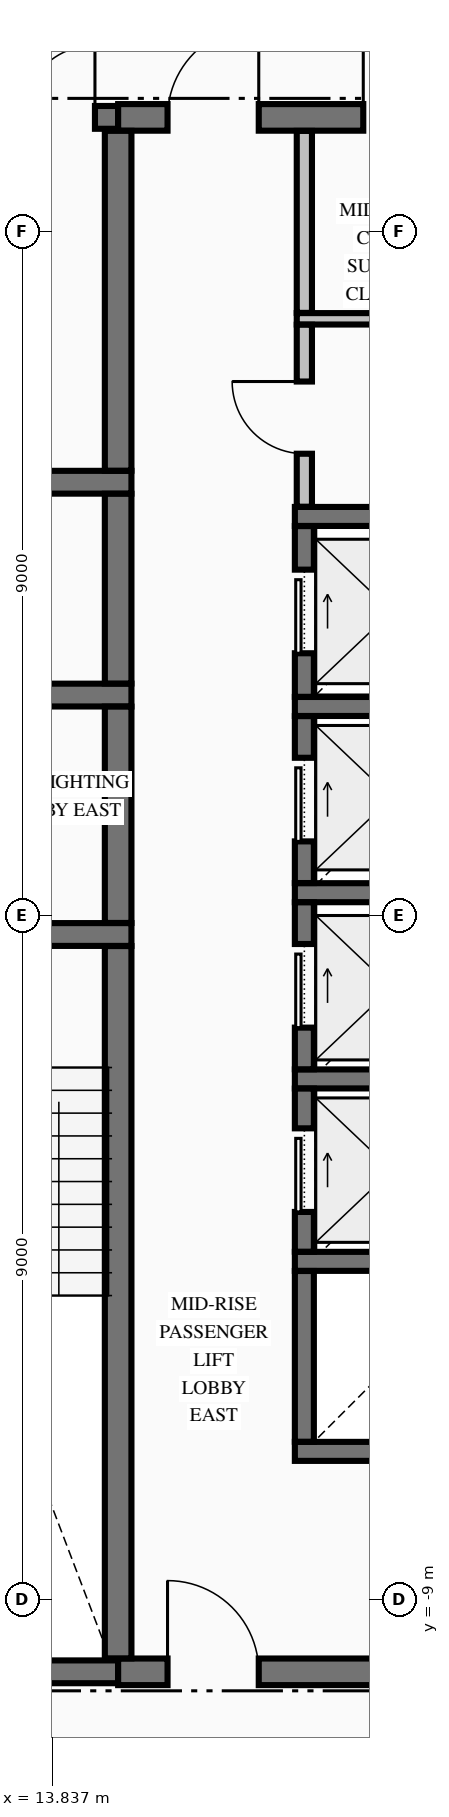
"""IFC4 building model, lengths in metres.
Left out: names, types, materials, properties, quantities, classifications, styles, units other than length and angle.
Written with IfcOpenShell. Run it as: python <this file> out.ifc"""

import sys

from ifc_helpers import new_model, si_unit, direction, frame, frame_2d, origin, place, context, subcontext, project, spatial, rectangle, extrude, element, fill, save


model = new_model("IFC4")
c1 = context("Model", 3, precision=1e-05, world=origin(), true_north=direction((0.0, 1.0)))
c2 = subcontext(c1, "Body", "Model", "MODEL_VIEW")
j1 = project(units=[si_unit("LENGTHUNIT", "METRE"), si_unit("PLANEANGLEUNIT", "RADIAN")], contexts=[c1])
p1 = place(None, origin())
s1 = spatial("IfcSite", under=j1, at=p1, CompositionType="ELEMENT")
p2 = place(p1, origin())
s2 = spatial("IfcBuilding", under=s1, at=p2, CompositionType="ELEMENT")
p3 = place(p2, frame((0.0, 0.0, 146.34)))
s3 = spatial("IfcBuildingStorey", under=s2, at=p3, CompositionType="ELEMENT", Elevation=146.34)
p4 = place(p3, frame((11.504, -9.95, 0.0), z_axis=(0.0, 0.0, 1.0), x_axis=(1.0, 0.0, 0.0)))
e1 = element("IfcWall", 1, at=p4, inside=s3, PredefinedType="SHEAR", context=c2, shape_type="SweptSolid", body=[
    extrude(rectangle(XDim=3.196, YDim=0.3, at=frame_2d((1.598, 0.0))), origin(), (0.0, 0.0, 1.0), 3.32),
])
p5 = place(p3, frame((14.7, -9.95, 0.0), z_axis=(0.0, 0.0, 1.0), x_axis=(1.0, 0.0, 0.0)))
e2 = element("IfcWall", 2, at=p5, inside=s3, PredefinedType="SHEAR", context=c2, shape_type="SweptSolid", body=[
    extrude(rectangle(XDim=4.796, YDim=0.35, at=frame_2d((2.398, 0.0))), origin(), (0.0, 0.0, 1.0), 3.32),
])
p6 = place(p5, frame((0.65, 0.0, 0.0)))
e3 = element("IfcOpeningElement", 3, at=p6, cuts=e2, PredefinedType="OPENING", context=c2, shape_type="SweptSolid", body=[
    extrude(rectangle(XDim=1.2, YDim=2.15, at=frame_2d((0.6, 1.075))), frame((0.0, 0.185, 0.0), z_axis=(0.0, -1.0, 0.0), x_axis=(1.0, 0.0, 0.0)), (0.0, 0.0, 1.0), 0.37),
])
for number, where, z_axis, x_axis in (
    (4, (17.025, -7.05, 0.0), (0.0, 0.0, 1.0), (1.0, 0.0, 0.0)),
    (5, (17.025, -4.55, 0.0), (0.0, 0.0, 1.0), (1.0, 0.0, 0.0)),
    (6, (17.025, -2.15, 0.0), (0.0, 0.0, 1.0), (1.0, 0.0, 0.0)),
):
    element("IfcWall", number, at=place(p3, frame(where, z_axis=z_axis, x_axis=x_axis)), inside=s3, PredefinedType="SOLIDWALL", context=c2, shape_type="SweptSolid", body=[
        extrude(rectangle(XDim=3.15, YDim=0.25, at=frame_2d((1.575, 0.0))), origin(), (0.0, 0.0, 1.0), 3.32),
    ])
p7 = place(p3, frame((11.504, -0.25, 0.0), z_axis=(0.0, 0.0, 1.0), x_axis=(1.0, 0.0, 0.0)))
e7 = element("IfcWall", 7, at=p7, inside=s3, PredefinedType="SHEAR", context=c2, shape_type="SweptSolid", body=[
    extrude(rectangle(XDim=3.371, YDim=0.3, at=frame_2d((1.686, 0.0))), origin(), (0.0, 0.0, 1.0), 3.32),
])
p8 = place(p7, frame((1.096, 0.0, 0.0)))
e8 = element("IfcOpeningElement", 8, at=p8, cuts=e7, PredefinedType="OPENING", context=c2, shape_type="SweptSolid", body=[
    extrude(rectangle(XDim=1.1, YDim=2.15, at=frame_2d((0.55, 1.075))), frame((0.0, 0.16, 0.0), z_axis=(0.0, -1.0, 0.0), x_axis=(1.0, 0.0, 0.0)), (0.0, 0.0, 1.0), 0.32),
])
p9 = place(p3, frame((17.025, 0.3, 0.0), z_axis=(0.0, 0.0, 1.0), x_axis=(1.0, 0.0, 0.0)))
e9 = element("IfcWall", 9, at=p9, inside=s3, PredefinedType="SOLIDWALL", context=c2, shape_type="SweptSolid", body=[
    extrude(rectangle(XDim=2.471, YDim=0.25, at=frame_2d((1.236, 0.0))), origin(), (0.0, 0.0, 1.0), 3.32),
])
p10 = place(p3, frame((17.025, 2.75, 0.0), z_axis=(0.0, 0.0, 1.0), x_axis=(1.0, 0.0, 0.0)))
e10 = element("IfcWall", 10, at=p10, inside=s3, PredefinedType="SOLIDWALL", context=c2, shape_type="SweptSolid", body=[
    extrude(rectangle(XDim=3.15, YDim=0.25, at=frame_2d((1.575, 0.0))), origin(), (0.0, 0.0, 1.0), 3.32),
])
p11 = place(p3, frame((10.85, 2.9, 0.0), z_axis=(0.0, 0.0, 1.0), x_axis=(1.0, 0.0, 0.0)))
e11 = element("IfcWall", 11, at=p11, inside=s3, PredefinedType="SHEAR", context=c2, shape_type="SweptSolid", body=[
    extrude(rectangle(XDim=4.025, YDim=0.3, at=frame_2d((2.012, 0.0))), origin(), (0.0, 0.0, 1.0), 3.32),
])
p12 = place(p11, frame((0.85, 0.0, 0.0)))
e12 = element("IfcOpeningElement", 12, at=p12, cuts=e11, PredefinedType="OPENING", context=c2, shape_type="SweptSolid", body=[
    extrude(rectangle(XDim=1.1, YDim=2.2, at=frame_2d((0.55, 1.1))), frame((0.0, 0.16, 0.0), z_axis=(0.0, -1.0, 0.0), x_axis=(1.0, 0.0, 0.0)), (0.0, 0.0, 1.0), 0.32),
])
p13 = place(p3, frame((17.025, 5.25, 0.0), z_axis=(0.0, 0.0, 1.0), x_axis=(1.0, 0.0, 0.0)))
e13 = element("IfcWall", 13, at=p13, inside=s3, PredefinedType="SOLIDWALL", context=c2, shape_type="SweptSolid", body=[
    extrude(rectangle(XDim=3.15, YDim=0.25, at=frame_2d((1.575, 0.0))), origin(), (0.0, 0.0, 1.0), 3.32),
])
p14 = place(p3, frame((10.85, 5.7, 0.0), z_axis=(0.0, 0.0, 1.0), x_axis=(1.0, 0.0, 0.0)))
e14 = element("IfcWall", 14, at=p14, inside=s3, PredefinedType="SHEAR", context=c2, shape_type="SweptSolid", body=[
    extrude(rectangle(XDim=4.025, YDim=0.3, at=frame_2d((2.012, 0.0))), origin(), (0.0, 0.0, 1.0), 3.32),
])
p15 = place(p3, frame((11.504, 10.5, 0.0), z_axis=(0.0, 0.0, 1.0), x_axis=(1.0, 0.0, 0.0)))
e15 = element("IfcWall", 15, at=p15, inside=s3, PredefinedType="SHEAR", context=c2, shape_type="SweptSolid", body=[
    extrude(rectangle(XDim=3.196, YDim=0.3, at=frame_2d((1.598, 0.0))), origin(), (0.0, 0.0, 1.0), 3.32),
])
p16 = place(p15, frame((1.941, 0.0, 0.0)))
e16 = element("IfcOpeningElement", 16, at=p16, cuts=e15, PredefinedType="OPENING", context=c2, shape_type="SweptSolid", body=[
    extrude(rectangle(XDim=0.95, YDim=2.15, at=frame_2d((0.475, 1.075))), frame((0.0, 0.16, 0.0), z_axis=(0.0, -1.0, 0.0), x_axis=(1.0, 0.0, 0.0)), (0.0, 0.0, 1.0), 0.32),
])
p17 = place(p3, frame((14.7, 10.5, 0.0), z_axis=(0.0, 0.0, 1.0), x_axis=(1.0, 0.0, 0.0)))
e17 = element("IfcWall", 17, at=p17, inside=s3, PredefinedType="SHEAR", context=c2, shape_type="SweptSolid", body=[
    extrude(rectangle(XDim=4.796, YDim=0.35, at=frame_2d((2.398, 0.0))), origin(), (0.0, 0.0, 1.0), 3.32),
])
p18 = place(p17, frame((0.65, 0.0, 0.0)))
e18 = element("IfcOpeningElement", 18, at=p18, cuts=e17, PredefinedType="OPENING", context=c2, shape_type="SweptSolid", body=[
    extrude(rectangle(XDim=1.2, YDim=2.15, at=frame_2d((0.6, 1.075))), frame((0.0, 0.185, 0.0), z_axis=(0.0, -1.0, 0.0), x_axis=(1.0, 0.0, 0.0)), (0.0, 0.0, 1.0), 0.37),
])
p19 = place(p17, frame((3.225, 0.0, 0.0)))
e19 = element("IfcOpeningElement", 19, at=p19, cuts=e17, PredefinedType="OPENING", context=c2, shape_type="SweptSolid", body=[
    extrude(rectangle(XDim=0.95, YDim=2.15, at=frame_2d((0.475, 1.075))), frame((0.0, 0.185, 0.0), z_axis=(0.0, -1.0, 0.0), x_axis=(1.0, 0.0, 0.0)), (0.0, 0.0, 1.0), 0.37),
])
p20 = place(p3, frame((17.05, 7.85, 0.0), z_axis=(0.0, 0.0, 1.0), x_axis=(1.0, 0.0, 0.0)))
e20 = element("IfcWall", 20, at=p20, inside=s3, PredefinedType="PARTITIONING", context=c2, shape_type="SweptSolid", body=[
    extrude(rectangle(XDim=2.772, YDim=0.15, at=frame_2d((1.386, 0.0))), origin(), (0.0, 0.0, 1.0), 3.32),
])
p21 = place(p3, frame((14.7, -9.773, 0.0), z_axis=(0.0, 0.0, 1.0), x_axis=(0.0, 1.0, 0.0)))
e21 = element("IfcWall", 21, at=p21, inside=s3, PredefinedType="SHEAR", context=c2, shape_type="SweptSolid", body=[
    extrude(rectangle(XDim=9.371, YDim=0.35, at=frame_2d((4.686, 0.0))), origin(), (0.0, 0.0, 1.0), 3.32),
])
p22 = place(p3, frame((14.7, -0.098, 0.0), z_axis=(0.0, 0.0, 1.0), x_axis=(0.0, 1.0, 0.0)))
e22 = element("IfcWall", 22, at=p22, inside=s3, PredefinedType="SHEAR", context=c2, shape_type="SweptSolid", body=[
    extrude(rectangle(XDim=2.846, YDim=0.35, at=frame_2d((1.423, 0.0))), origin(), (0.0, 0.0, 1.0), 3.32),
])
p23 = place(p3, frame((14.7, 3.052, 0.0), z_axis=(0.0, 0.0, 1.0), x_axis=(0.0, 1.0, 0.0)))
e23 = element("IfcWall", 23, at=p23, inside=s3, PredefinedType="SHEAR", context=c2, shape_type="SweptSolid", body=[
    extrude(rectangle(XDim=2.496, YDim=0.35, at=frame_2d((1.248, 0.0))), origin(), (0.0, 0.0, 1.0), 3.32),
])
p24 = place(p3, frame((14.7, 5.852, 0.0), z_axis=(0.0, 0.0, 1.0), x_axis=(0.0, 1.0, 0.0)))
e24 = element("IfcWall", 24, at=p24, inside=s3, PredefinedType="SHEAR", context=c2, shape_type="SweptSolid", body=[
    extrude(rectangle(XDim=4.471, YDim=0.35, at=frame_2d((2.235, 0.0))), origin(), (0.0, 0.0, 1.0), 3.32),
])
p25 = place(p3, frame((17.15, -6.923, 0.0), z_axis=(0.0, 0.0, 1.0), x_axis=(0.0, 1.0, 0.0)))
e25 = element("IfcWall", 25, at=p25, inside=s3, PredefinedType="SOLIDWALL", context=c2, shape_type="SweptSolid", body=[
    extrude(rectangle(XDim=2.246, YDim=0.25, at=frame_2d((1.123, 0.0))), origin(), (0.0, 0.0, 1.0), 3.32),
])
p26 = place(p3, frame((17.15, -4.423, 0.0), z_axis=(0.0, 0.0, 1.0), x_axis=(0.0, 1.0, 0.0)))
e26 = element("IfcWall", 26, at=p26, inside=s3, PredefinedType="SOLIDWALL", context=c2, shape_type="SweptSolid", body=[
    extrude(rectangle(XDim=2.146, YDim=0.25, at=frame_2d((1.073, 0.0))), origin(), (0.0, 0.0, 1.0), 3.32),
])
p27 = place(p26, frame((0.523, 0.0, 0.0)))
e27 = element("IfcOpeningElement", 27, at=p27, cuts=e26, PredefinedType="OPENING", context=c2, shape_type="SweptSolid", body=[
    extrude(rectangle(XDim=1.1, YDim=2.2, at=frame_2d((0.55, 1.1))), frame((0.0, 0.135, 0.0), z_axis=(0.0, -1.0, 0.0), x_axis=(1.0, 0.0, 0.0)), (0.0, 0.0, 1.0), 0.27),
])
p28 = place(p3, frame((17.15, -2.023, 0.0), z_axis=(0.0, 0.0, 1.0), x_axis=(0.0, 1.0, 0.0)))
e28 = element("IfcWall", 28, at=p28, inside=s3, PredefinedType="SOLIDWALL", context=c2, shape_type="SweptSolid", body=[
    extrude(rectangle(XDim=2.196, YDim=0.25, at=frame_2d((1.098, 0.0))), origin(), (0.0, 0.0, 1.0), 3.32),
])
p29 = place(p28, frame((0.548, 0.0, 0.0)))
e29 = element("IfcOpeningElement", 29, at=p29, cuts=e28, PredefinedType="OPENING", context=c2, shape_type="SweptSolid", body=[
    extrude(rectangle(XDim=1.1, YDim=2.2, at=frame_2d((0.55, 1.1))), frame((0.0, 0.135, 0.0), z_axis=(0.0, -1.0, 0.0), x_axis=(1.0, 0.0, 0.0)), (0.0, 0.0, 1.0), 0.27),
])
p30 = place(p3, frame((17.15, 0.427, 0.0), z_axis=(0.0, 0.0, 1.0), x_axis=(0.0, 1.0, 0.0)))
e30 = element("IfcWall", 30, at=p30, inside=s3, PredefinedType="SOLIDWALL", context=c2, shape_type="SweptSolid", body=[
    extrude(rectangle(XDim=2.196, YDim=0.25, at=frame_2d((1.098, 0.0))), origin(), (0.0, 0.0, 1.0), 3.32),
])
p31 = place(p30, frame((0.548, 0.0, 0.0)))
e31 = element("IfcOpeningElement", 31, at=p31, cuts=e30, PredefinedType="OPENING", context=c2, shape_type="SweptSolid", body=[
    extrude(rectangle(XDim=1.1, YDim=2.2, at=frame_2d((0.55, 1.1))), frame((0.0, 0.135, 0.0), z_axis=(0.0, -1.0, 0.0), x_axis=(1.0, 0.0, 0.0)), (0.0, 0.0, 1.0), 0.27),
])
p32 = place(p3, frame((17.15, 2.877, 0.0), z_axis=(0.0, 0.0, 1.0), x_axis=(0.0, 1.0, 0.0)))
e32 = element("IfcWall", 32, at=p32, inside=s3, PredefinedType="SOLIDWALL", context=c2, shape_type="SweptSolid", body=[
    extrude(rectangle(XDim=2.246, YDim=0.25, at=frame_2d((1.123, 0.0))), origin(), (0.0, 0.0, 1.0), 3.32),
])
p33 = place(p32, frame((0.573, 0.0, 0.0)))
e33 = element("IfcOpeningElement", 33, at=p33, cuts=e32, PredefinedType="OPENING", context=c2, shape_type="SweptSolid", body=[
    extrude(rectangle(XDim=1.1, YDim=2.2, at=frame_2d((0.55, 1.1))), frame((0.0, 0.135, 0.0), z_axis=(0.0, -1.0, 0.0), x_axis=(1.0, 0.0, 0.0)), (0.0, 0.0, 1.0), 0.27),
])
p34 = place(p3, frame((17.15, 5.378, 0.0), z_axis=(0.0, 0.0, 1.0), x_axis=(0.0, 1.0, 0.0)))
e34 = element("IfcWall", 34, at=p34, inside=s3, PredefinedType="PARTITIONING", context=c2, shape_type="SweptSolid", body=[
    extrude(rectangle(XDim=2.394, YDim=0.2, at=frame_2d((1.197, 0.0))), origin(), (0.0, 0.0, 1.0), 3.32),
])
p35 = place(p34, frame((0.697, 0.0, 0.0)))
e35 = element("IfcOpeningElement", 35, at=p35, cuts=e34, PredefinedType="OPENING", context=c2, shape_type="SweptSolid", body=[
    extrude(rectangle(XDim=0.95, YDim=2.15, at=frame_2d((0.475, 1.075))), frame((0.0, 0.11, 0.0), z_axis=(0.0, -1.0, 0.0), x_axis=(1.0, 0.0, 0.0)), (0.0, 0.0, 1.0), 0.22),
])
p36 = place(p3, frame((17.15, 7.928, 0.0), z_axis=(0.0, 0.0, 1.0), x_axis=(0.0, 1.0, 0.0)))
e36 = element("IfcWall", 36, at=p36, inside=s3, PredefinedType="PARTITIONING", context=c2, shape_type="SweptSolid", body=[
    extrude(rectangle(XDim=2.394, YDim=0.2, at=frame_2d((1.197, 0.0))), origin(), (0.0, 0.0, 1.0), 3.32),
])
p37 = place(p16, origin())
e37 = element("IfcDoor", 37, at=p37, inside=s3, OperationType="SINGLE_SWING_RIGHT", PredefinedType="DOOR", context=c2, shape_type="SweptSolid", body=[
    extrude(rectangle(XDim=0.95, YDim=2.15, at=frame_2d((0.475, 1.075))), frame((0.0, 0.025, 0.0), z_axis=(0.0, -1.0, 0.0), x_axis=(1.0, 0.0, 0.0)), (0.0, 0.0, 1.0), 0.05),
])
fill(e16, e37)
p38 = place(p27, origin())
e38 = element("IfcDoor", 38, at=p38, inside=s3, OperationType="SLIDING_TO_RIGHT", PredefinedType="DOOR", context=c2, shape_type="SweptSolid", body=[
    extrude(rectangle(XDim=1.1, YDim=2.2, at=frame_2d((0.55, 1.1))), frame((0.0, 0.025, 0.0), z_axis=(0.0, -1.0, 0.0), x_axis=(1.0, 0.0, 0.0)), (0.0, 0.0, 1.0), 0.05),
])
fill(e27, e38)
p39 = place(p29, origin())
e39 = element("IfcDoor", 39, at=p39, inside=s3, OperationType="SLIDING_TO_RIGHT", PredefinedType="DOOR", context=c2, shape_type="SweptSolid", body=[
    extrude(rectangle(XDim=1.1, YDim=2.2, at=frame_2d((0.55, 1.1))), frame((0.0, 0.025, 0.0), z_axis=(0.0, -1.0, 0.0), x_axis=(1.0, 0.0, 0.0)), (0.0, 0.0, 1.0), 0.05),
])
fill(e29, e39)
p40 = place(p31, origin())
e40 = element("IfcDoor", 40, at=p40, inside=s3, OperationType="SLIDING_TO_RIGHT", PredefinedType="DOOR", context=c2, shape_type="SweptSolid", body=[
    extrude(rectangle(XDim=1.1, YDim=2.2, at=frame_2d((0.55, 1.1))), frame((0.0, 0.025, 0.0), z_axis=(0.0, -1.0, 0.0), x_axis=(1.0, 0.0, 0.0)), (0.0, 0.0, 1.0), 0.05),
])
fill(e31, e40)
p41 = place(p33, origin())
e41 = element("IfcDoor", 41, at=p41, inside=s3, OperationType="SLIDING_TO_RIGHT", PredefinedType="DOOR", context=c2, shape_type="SweptSolid", body=[
    extrude(rectangle(XDim=1.1, YDim=2.2, at=frame_2d((0.55, 1.1))), frame((0.0, 0.025, 0.0), z_axis=(0.0, -1.0, 0.0), x_axis=(1.0, 0.0, 0.0)), (0.0, 0.0, 1.0), 0.05),
])
fill(e33, e41)
p42 = place(p6, origin())
e42 = element("IfcDoor", 42, at=p42, inside=s3, OperationType="SINGLE_SWING_LEFT", PredefinedType="DOOR", context=c2, shape_type="SweptSolid", body=[
    extrude(rectangle(XDim=1.2, YDim=2.15, at=frame_2d((0.6, 1.075))), frame((0.0, 0.025, 0.0), z_axis=(0.0, -1.0, 0.0), x_axis=(1.0, 0.0, 0.0)), (0.0, 0.0, 1.0), 0.05),
])
fill(e3, e42)
p43 = place(p18, origin())
e43 = element("IfcDoor", 43, at=p43, inside=s3, OperationType="SINGLE_SWING_RIGHT", PredefinedType="DOOR", context=c2, shape_type="SweptSolid", body=[
    extrude(rectangle(XDim=1.2, YDim=2.15, at=frame_2d((0.6, 1.075))), frame((0.0, 0.025, 0.0), z_axis=(0.0, -1.0, 0.0), x_axis=(1.0, 0.0, 0.0)), (0.0, 0.0, 1.0), 0.05),
])
fill(e18, e43)
p44 = place(p19, origin())
e44 = element("IfcDoor", 44, at=p44, inside=s3, OperationType="SINGLE_SWING_LEFT", PredefinedType="DOOR", context=c2, shape_type="SweptSolid", body=[
    extrude(rectangle(XDim=0.95, YDim=2.15, at=frame_2d((0.475, 1.075))), frame((0.0, 0.025, 0.0), z_axis=(0.0, -1.0, 0.0), x_axis=(1.0, 0.0, 0.0)), (0.0, 0.0, 1.0), 0.05),
])
fill(e19, e44)
p45 = place(p35, origin())
e45 = element("IfcDoor", 45, at=p45, inside=s3, OperationType="SINGLE_SWING_RIGHT", PredefinedType="DOOR", context=c2, shape_type="SweptSolid", body=[
    extrude(rectangle(XDim=0.95, YDim=2.15, at=frame_2d((0.475, 1.075))), frame((0.0, 0.025, 0.0), z_axis=(0.0, -1.0, 0.0), x_axis=(1.0, 0.0, 0.0)), (0.0, 0.0, 1.0), 0.05),
])
fill(e35, e45)
save(model, sys.argv[1])
